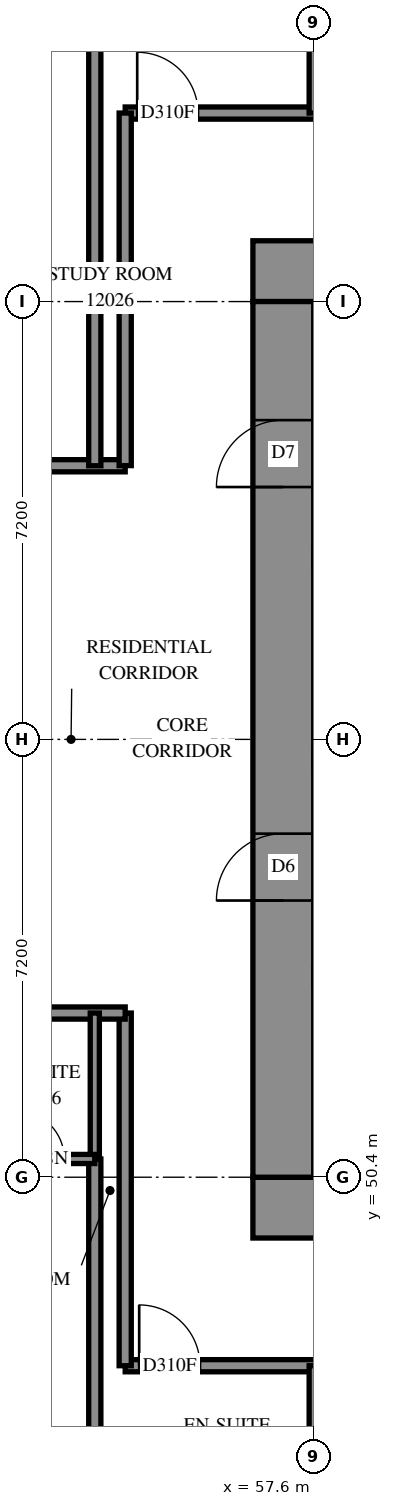
"""IFC4 building model, lengths in metres.
Left out: names, types, materials, properties, quantities, classifications, styles, units other than length and angle.
Written with IfcOpenShell. Run it as: python <this file> out.ifc"""

import sys

from ifc_helpers import new_model, si_unit, direction, frame, frame_2d, origin, place, context, subcontext, project, spatial, rectangle, extrude, element, fill, save


model = new_model("IFC4")
c1 = context("Model", 3, precision=1e-05, world=origin(), true_north=direction((0.0, 1.0)))
c2 = subcontext(c1, "Body", "Model", "MODEL_VIEW")
j1 = project(units=[si_unit("LENGTHUNIT", "METRE"), si_unit("PLANEANGLEUNIT", "RADIAN")], contexts=[c1])
p1 = place(None, origin())
s1 = spatial("IfcSite", under=j1, at=p1, CompositionType="ELEMENT")
p2 = place(p1, origin())
s2 = spatial("IfcBuilding", under=s1, at=p2, CompositionType="ELEMENT")
p3 = place(p2, frame((0.0, 0.0, 47.4)))
s3 = spatial("IfcBuildingStorey", under=s2, at=p3, CompositionType="ELEMENT", Elevation=47.4)
p4 = place(p3, frame((56.6, 49.9, -0.3), z_axis=(0.0, 0.0, 1.0), x_axis=(1.0, 0.0, 0.0)))
e1 = element("IfcWall", 1, at=p4, inside=s3, PredefinedType="SHEAR", context=c2, shape_type="SweptSolid", body=[
    extrude(rectangle(XDim=16.4, YDim=1.0, at=frame_2d((8.2, 0.0))), origin(), (0.0, 0.0, 1.0), 2.7),
])
p5 = place(p3, frame((56.6, 65.3, -0.3), z_axis=(0.0, 0.0, 1.0), x_axis=(1.0, 0.0, 0.0)))
e2 = element("IfcWall", 2, at=p5, inside=s3, PredefinedType="SHEAR", context=c2, shape_type="SweptSolid", body=[
    extrude(rectangle(XDim=16.4, YDim=1.0, at=frame_2d((8.2, 0.0))), origin(), (0.0, 0.0, 1.0), 2.7),
])
p6 = place(p5, frame((11.0, 0.0, 0.3)))
e3 = element("IfcOpeningElement", 3, at=p6, cuts=e2, PredefinedType="OPENING", context=c2, shape_type="SweptSolid", body=[
    extrude(rectangle(XDim=0.8, YDim=2.1, at=frame_2d((0.4, 1.05))), frame((0.0, 0.51, 0.0), z_axis=(0.0, -1.0, 0.0), x_axis=(1.0, 0.0, 0.0)), (0.0, 0.0, 1.0), 1.02),
])
p7 = place(p3, frame((57.1, 50.4, -0.3), z_axis=(0.0, 0.0, 1.0), x_axis=(0.0, 1.0, 0.0)))
e4 = element("IfcWall", 4, at=p7, inside=s3, PredefinedType="SHEAR", context=c2, shape_type="SweptSolid", body=[
    extrude(rectangle(XDim=14.4, YDim=1.0, at=frame_2d((7.2, 0.0))), origin(), (0.0, 0.0, 1.0), 2.7),
])
p8 = place(p7, frame((4.55, 0.0, 0.3)))
e5 = element("IfcOpeningElement", 5, at=p8, cuts=e4, PredefinedType="OPENING", context=c2, shape_type="SweptSolid", body=[
    extrude(rectangle(XDim=1.1, YDim=2.1, at=frame_2d((0.55, 1.05))), frame((0.0, 0.51, 0.0), z_axis=(0.0, -1.0, 0.0), x_axis=(1.0, 0.0, 0.0)), (0.0, 0.0, 1.0), 1.02),
])
p9 = place(p7, frame((11.35, 0.0, 0.3)))
e6 = element("IfcOpeningElement", 6, at=p9, cuts=e4, PredefinedType="OPENING", context=c2, shape_type="SweptSolid", body=[
    extrude(rectangle(XDim=1.1, YDim=2.1, at=frame_2d((0.55, 1.05))), frame((0.0, 0.51, 0.0), z_axis=(0.0, -1.0, 0.0), x_axis=(1.0, 0.0, 0.0)), (0.0, 0.0, 1.0), 1.02),
])
p10 = place(p3, frame((33.3, 62.1, 0.0), z_axis=(0.0, 0.0, 1.0), x_axis=(1.0, 0.0, 0.0)))
e7 = element("IfcWall", 7, at=p10, inside=s3, PredefinedType="PARTITIONING", context=c2, shape_type="SweptSolid", body=[
    extrude(rectangle(XDim=21.2, YDim=0.2, at=frame_2d((10.6, 0.0))), origin(), (0.0, 0.0, 1.0), 3.1),
])
p11 = place(p10, frame((1.395, 0.0, 0.0)))
e8 = element("IfcOpeningElement", 8, at=p11, cuts=e7, PredefinedType="OPENING", context=c2, shape_type="SweptSolid", body=[
    extrude(rectangle(XDim=0.9, YDim=2.1, at=frame_2d((0.45, 1.05))), frame((0.0, 0.11, 0.0), z_axis=(0.0, -1.0, 0.0), x_axis=(1.0, 0.0, 0.0)), (0.0, 0.0, 1.0), 0.22),
])
p12 = place(p10, frame((8.674, 0.0, 0.0)))
e9 = element("IfcOpeningElement", 9, at=p12, cuts=e7, PredefinedType="OPENING", context=c2, shape_type="SweptSolid", body=[
    extrude(rectangle(XDim=1.0, YDim=2.1, at=frame_2d((0.5, 1.05))), frame((0.0, 0.11, 0.0), z_axis=(0.0, -1.0, 0.0), x_axis=(1.0, 0.0, 0.0)), (0.0, 0.0, 1.0), 0.22),
])
p13 = place(p10, frame((15.874, 0.0, 0.0)))
e10 = element("IfcOpeningElement", 10, at=p13, cuts=e7, PredefinedType="OPENING", context=c2, shape_type="SweptSolid", body=[
    extrude(rectangle(XDim=1.0, YDim=2.1, at=frame_2d((0.5, 1.05))), frame((0.0, 0.11, 0.0), z_axis=(0.0, -1.0, 0.0), x_axis=(1.0, 0.0, 0.0)), (0.0, 0.0, 1.0), 0.22),
])
p14 = place(p3, frame((54.5, 67.9, 0.0), z_axis=(0.0, 0.0, 1.0), x_axis=(1.0, 0.0, 0.0)))
e11 = element("IfcWall", 11, at=p14, inside=s3, PredefinedType="PARTITIONING", context=c2, shape_type="SweptSolid", body=[
    extrude(rectangle(XDim=20.6, YDim=0.2, at=frame_2d((10.3, 0.0))), origin(), (0.0, 0.0, 1.0), 3.1),
])
p15 = place(p14, frame((0.198, 0.0, 0.0)))
e12 = element("IfcOpeningElement", 12, at=p15, cuts=e11, PredefinedType="OPENING", context=c2, shape_type="SweptSolid", body=[
    extrude(rectangle(XDim=1.0, YDim=2.1, at=frame_2d((0.5, 1.05))), frame((0.0, 0.11, 0.0), z_axis=(0.0, -1.0, 0.0), x_axis=(1.0, 0.0, 0.0)), (0.0, 0.0, 1.0), 0.22),
])
p16 = place(p14, frame((19.358, 0.0, 0.0)))
e13 = element("IfcOpeningElement", 13, at=p16, cuts=e11, PredefinedType="OPENING", context=c2, shape_type="SweptSolid", body=[
    extrude(rectangle(XDim=1.0, YDim=2.1, at=frame_2d((0.5, 1.05))), frame((0.0, 0.11, 0.0), z_axis=(0.0, -1.0, 0.0), x_axis=(1.0, 0.0, 0.0)), (0.0, 0.0, 1.0), 0.22),
])
p17 = place(p14, frame((6.698, 0.0, 0.0)))
e14 = element("IfcOpeningElement", 14, at=p17, cuts=e11, PredefinedType="OPENING", context=c2, shape_type="SweptSolid", body=[
    extrude(rectangle(XDim=0.9, YDim=2.1, at=frame_2d((0.45, 1.05))), frame((0.0, 0.11, 0.0), z_axis=(0.0, -1.0, 0.0), x_axis=(1.0, 0.0, 0.0)), (0.0, 0.0, 1.0), 0.22),
])
p18 = place(p14, frame((13.884, 0.0, 0.0)))
e15 = element("IfcOpeningElement", 15, at=p18, cuts=e11, PredefinedType="OPENING", context=c2, shape_type="SweptSolid", body=[
    extrude(rectangle(XDim=1.0, YDim=2.1, at=frame_2d((0.5, 1.05))), frame((0.0, 0.11, 0.0), z_axis=(0.0, -1.0, 0.0), x_axis=(1.0, 0.0, 0.0)), (0.0, 0.0, 1.0), 0.22),
])
p19 = place(p3, frame((54.5, 47.3, 0.0), z_axis=(0.0, 0.0, 1.0), x_axis=(1.0, 0.0, 0.0)))
e16 = element("IfcWall", 16, at=p19, inside=s3, PredefinedType="PARTITIONING", context=c2, shape_type="SweptSolid", body=[
    extrude(rectangle(XDim=19.56, YDim=0.2, at=frame_2d((9.78, 0.0))), origin(), (0.0, 0.0, 1.0), 3.1),
])
p20 = place(p19, frame((0.23, 0.0, 0.0)))
e17 = element("IfcOpeningElement", 17, at=p20, cuts=e16, PredefinedType="OPENING", context=c2, shape_type="SweptSolid", body=[
    extrude(rectangle(XDim=1.0, YDim=2.1, at=frame_2d((0.5, 1.05))), frame((0.0, 0.11, 0.0), z_axis=(0.0, -1.0, 0.0), x_axis=(1.0, 0.0, 0.0)), (0.0, 0.0, 1.0), 0.22),
])
p21 = place(p19, frame((5.4, 0.0, 0.0)))
e18 = element("IfcOpeningElement", 18, at=p21, cuts=e16, PredefinedType="OPENING", context=c2, shape_type="SweptSolid", body=[
    extrude(rectangle(XDim=0.9, YDim=2.1, at=frame_2d((0.45, 1.05))), frame((0.0, 0.11, 0.0), z_axis=(0.0, -1.0, 0.0), x_axis=(1.0, 0.0, 0.0)), (0.0, 0.0, 1.0), 0.22),
])
p22 = place(p19, frame((9.001, 0.0, 0.0)))
e19 = element("IfcOpeningElement", 19, at=p22, cuts=e16, PredefinedType="OPENING", context=c2, shape_type="SweptSolid", body=[
    extrude(rectangle(XDim=0.9, YDim=2.1, at=frame_2d((0.45, 1.05))), frame((0.0, 0.11, 0.0), z_axis=(0.0, -1.0, 0.0), x_axis=(1.0, 0.0, 0.0)), (0.0, 0.0, 1.0), 0.22),
])
p23 = place(p19, frame((14.3, 0.0, 0.0)))
e20 = element("IfcOpeningElement", 20, at=p23, cuts=e16, PredefinedType="OPENING", context=c2, shape_type="SweptSolid", body=[
    extrude(rectangle(XDim=0.9, YDim=2.1, at=frame_2d((0.45, 1.05))), frame((0.0, 0.11, 0.0), z_axis=(0.0, -1.0, 0.0), x_axis=(1.0, 0.0, 0.0)), (0.0, 0.0, 1.0), 0.22),
])
p24 = place(p3, frame((54.0, 62.1, 0.0), z_axis=(0.0, 0.0, 1.0), x_axis=(0.0, 1.0, 0.0)))
e21 = element("IfcWall", 21, at=p24, inside=s3, PredefinedType="PARTITIONING", context=c2, shape_type="SweptSolid", body=[
    extrude(rectangle(XDim=10.605, YDim=0.2, at=frame_2d((5.302, 0.0))), origin(), (0.0, 0.0, 1.0), 3.1),
])
p25 = place(p3, frame((54.0, 42.36, 0.0), z_axis=(0.0, 0.0, 1.0), x_axis=(0.0, 1.0, 0.0)))
e22 = element("IfcWall", 22, at=p25, inside=s3, PredefinedType="PARTITIONING", context=c2, shape_type="SweptSolid", body=[
    extrude(rectangle(XDim=8.34, YDim=0.2, at=frame_2d((4.17, 0.0))), origin(), (0.0, 0.0, 1.0), 3.1),
])
p26 = place(p3, frame((54.5, 47.3, 0.0), z_axis=(0.0, 0.0, 1.0), x_axis=(0.0, 1.0, 0.0)))
e23 = element("IfcWall", 23, at=p26, inside=s3, PredefinedType="PARTITIONING", context=c2, shape_type="SweptSolid", body=[
    extrude(rectangle(XDim=5.8, YDim=0.2, at=frame_2d((2.9, 0.0))), origin(), (0.0, 0.0, 1.0), 3.1),
])
p27 = place(p3, frame((54.5, 62.102, 0.0), z_axis=(0.0, 0.0, 1.0), x_axis=(0.0, 1.0, 0.0)))
e24 = element("IfcWall", 24, at=p27, inside=s3, PredefinedType="PARTITIONING", context=c2, shape_type="SweptSolid", body=[
    extrude(rectangle(XDim=5.798, YDim=0.2, at=frame_2d((2.899, 0.0))), origin(), (0.0, 0.0, 1.0), 3.1),
])
p28 = place(p3, frame((50.4, 53.1, 0.0), z_axis=(0.0, 0.0, 1.0), x_axis=(1.0, 0.0, 0.0)))
e25 = element("IfcWall", 25, at=p28, inside=s3, PredefinedType="PARTITIONING", context=c2, shape_type="SweptSolid", body=[
    extrude(rectangle(XDim=4.1, YDim=0.2, at=frame_2d((2.05, 0.0))), origin(), (0.0, 0.0, 1.0), 3.1),
])
p29 = place(p28, frame((0.4, 0.0, 0.0)))
e26 = element("IfcOpeningElement", 26, at=p29, cuts=e25, PredefinedType="OPENING", context=c2, shape_type="SweptSolid", body=[
    extrude(rectangle(XDim=0.9, YDim=2.1, at=frame_2d((0.45, 1.05))), frame((0.0, 0.11, 0.0), z_axis=(0.0, -1.0, 0.0), x_axis=(1.0, 0.0, 0.0)), (0.0, 0.0, 1.0), 0.22),
])
for number, where, z_axis, x_axis in (
    (27, (54.0, 50.7, 0.0), (0.0, 0.0, 1.0), (0.0, 1.0, 0.0)),
    (28, (57.6, 44.9, 0.0), (0.0, 0.0, 1.0), (0.0, 1.0, 0.0)),
    (29, (57.6, 67.9, 0.0), (0.0, 0.0, 1.0), (0.0, 1.0, 0.0)),
):
    element("IfcWall", number, at=place(p3, frame(where, z_axis=z_axis, x_axis=x_axis)), inside=s3, PredefinedType="PARTITIONING", context=c2, shape_type="SweptSolid", body=[
        extrude(rectangle(XDim=2.4, YDim=0.15, at=frame_2d((1.2, 0.0))), origin(), (0.0, 0.0, 1.0), 3.1),
    ])
p30 = place(p3, frame((52.1, 50.7, 0.0), z_axis=(0.0, 0.0, 1.0), x_axis=(1.0, 0.0, 0.0)))
e30 = element("IfcWall", 30, at=p30, inside=s3, PredefinedType="PARTITIONING", context=c2, shape_type="SweptSolid", body=[
    extrude(rectangle(XDim=1.9, YDim=0.15, at=frame_2d((0.95, 0.0))), origin(), (0.0, 0.0, 1.0), 3.1),
])
p31 = place(p30, frame((0.598, 0.0, 0.0)))
e31 = element("IfcOpeningElement", 31, at=p31, cuts=e30, PredefinedType="OPENING", context=c2, shape_type="SweptSolid", body=[
    extrude(rectangle(XDim=0.8, YDim=2.1, at=frame_2d((0.4, 1.05))), frame((0.0, 0.085, 0.0), z_axis=(0.0, -1.0, 0.0), x_axis=(1.0, 0.0, 0.0)), (0.0, 0.0, 1.0), 0.17),
])
p32 = place(p8, origin())
e32 = element("IfcDoor", 32, at=p32, inside=s3, OperationType="DOUBLE_DOOR_SINGLE_SWING", PredefinedType="DOOR", context=c2, shape_type="SweptSolid", body=[
    extrude(rectangle(XDim=1.1, YDim=2.1, at=frame_2d((0.55, 1.05))), frame((0.0, 0.025, 0.0), z_axis=(0.0, -1.0, 0.0), x_axis=(1.0, 0.0, 0.0)), (0.0, 0.0, 1.0), 0.05),
])
fill(e5, e32)
p33 = place(p9, origin())
e33 = element("IfcDoor", 33, at=p33, inside=s3, OperationType="SINGLE_SWING_LEFT", PredefinedType="DOOR", context=c2, shape_type="SweptSolid", body=[
    extrude(rectangle(XDim=1.1, YDim=2.1, at=frame_2d((0.55, 1.05))), frame((0.0, 0.025, 0.0), z_axis=(0.0, -1.0, 0.0), x_axis=(1.0, 0.0, 0.0)), (0.0, 0.0, 1.0), 0.05),
])
fill(e6, e33)
p34 = place(p15, origin())
e34 = element("IfcDoor", 34, at=p34, inside=s3, OperationType="SINGLE_SWING_LEFT", PredefinedType="DOOR", context=c2, shape_type="SweptSolid", body=[
    extrude(rectangle(XDim=1.0, YDim=2.1, at=frame_2d((0.5, 1.05))), frame((0.0, 0.025, 0.0), z_axis=(0.0, -1.0, 0.0), x_axis=(1.0, 0.0, 0.0)), (0.0, 0.0, 1.0), 0.05),
])
fill(e12, e34)
p35 = place(p31, origin())
e35 = element("IfcDoor", 35, at=p35, inside=s3, OperationType="SINGLE_SWING_RIGHT", PredefinedType="DOOR", context=c2, shape_type="SweptSolid", body=[
    extrude(rectangle(XDim=0.8, YDim=2.1, at=frame_2d((0.4, 1.05))), frame((0.0, 0.025, 0.0), z_axis=(0.0, -1.0, 0.0), x_axis=(1.0, 0.0, 0.0)), (0.0, 0.0, 1.0), 0.05),
])
fill(e31, e35)
p36 = place(p20, origin())
e36 = element("IfcDoor", 36, at=p36, inside=s3, OperationType="SINGLE_SWING_RIGHT", PredefinedType="DOOR", context=c2, shape_type="SweptSolid", body=[
    extrude(rectangle(XDim=1.0, YDim=2.1, at=frame_2d((0.5, 1.05))), frame((0.0, 0.025, 0.0), z_axis=(0.0, -1.0, 0.0), x_axis=(1.0, 0.0, 0.0)), (0.0, 0.0, 1.0), 0.05),
])
fill(e17, e36)
save(model, sys.argv[1])
